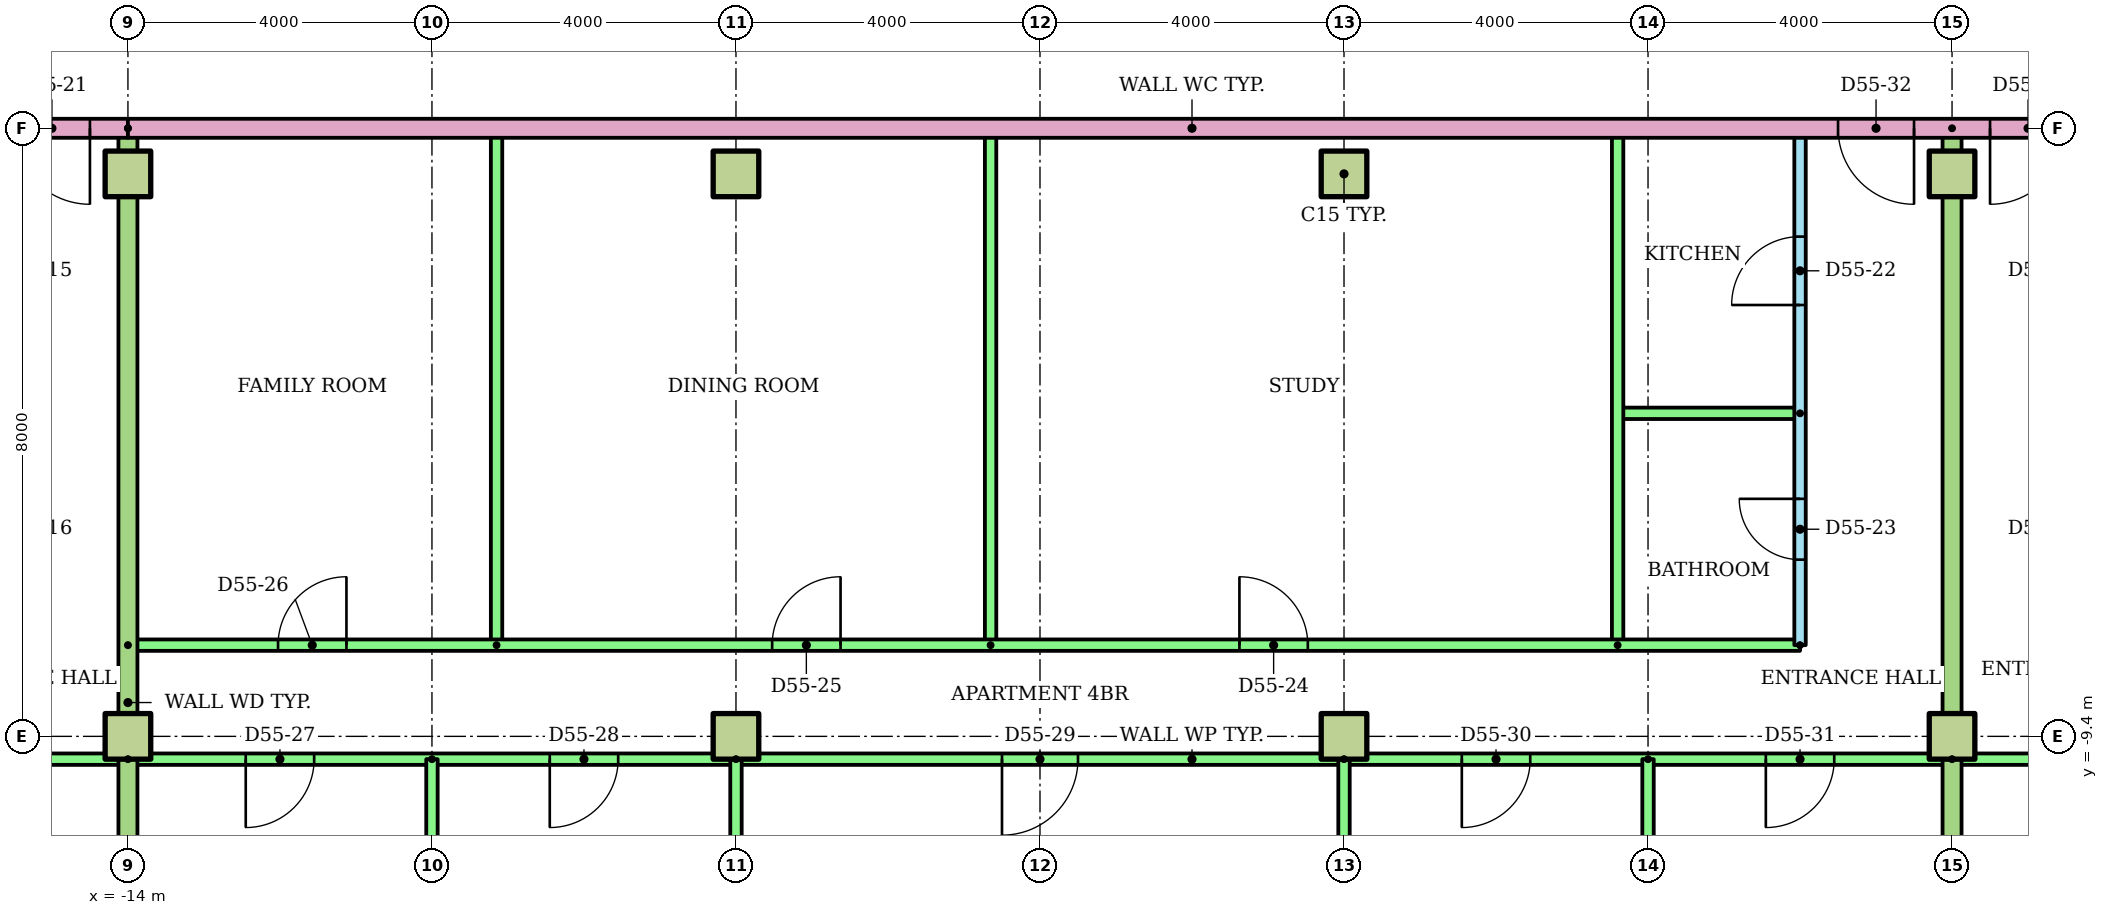
"""IFC4 building model, lengths in metres.
Left out: names, types, materials, properties, quantities, classifications, styles, units other than length and angle.
Written with IfcOpenShell. Run it as: python <this file> out.ifc"""

import sys

from ifc_helpers import new_model, si_unit, direction, frame, frame_2d, origin, origin_2d, place, context, subcontext, project, spatial, rectangle, extrude, element, fill, save


model = new_model("IFC4")
c1 = context("Model", 3, precision=1e-05, world=origin(), true_north=direction((0.0, 1.0)))
c2 = subcontext(c1, "Body", "Model", "MODEL_VIEW")
j1 = project(units=[si_unit("LENGTHUNIT", "METRE"), si_unit("PLANEANGLEUNIT", "RADIAN")], contexts=[c1])
p1 = place(None, origin())
s1 = spatial("IfcSite", under=j1, at=p1, CompositionType="ELEMENT")
p2 = place(p1, origin())
s2 = spatial("IfcBuilding", under=s1, at=p2, CompositionType="ELEMENT")
p3 = place(p2, frame((0.0, 0.0, 214.0)))
s3 = spatial("IfcBuildingStorey", under=s2, at=p3, CompositionType="ELEMENT", Elevation=214.0)
for number, where in (
    (1, (-14.0, -9.4, 0.0)),
    (2, (-6.0, -9.4, 0.0)),
    (3, (2.0, -9.4, 0.0)),
    (4, (10.0, -9.4, 0.0)),
    (5, (-14.0, -2.0, 0.0)),
    (6, (-6.0, -2.0, 0.0)),
    (7, (2.0, -2.0, 0.0)),
    (8, (10.0, -2.0, 0.0)),
):
    element("IfcColumn", number, at=place(p3, frame(where)), inside=s3, PredefinedType="COLUMN", context=c2, shape_type="SweptSolid", body=[
        extrude(rectangle(XDim=0.6, YDim=0.6, at=origin_2d()), origin(), (0.0, 0.0, 1.0), 3.2),
    ])
p4 = place(p3, frame((-14.0, -9.7, 0.0), z_axis=(0.0, 0.0, 1.0), x_axis=(-1.0, 0.0, 0.0)))
e9 = element("IfcWall", 9, at=p4, inside=s3, PredefinedType="PARTITIONING", context=c2, shape_type="SweptSolid", body=[
    extrude(rectangle(XDim=14.92, YDim=0.15, at=frame_2d((7.46, 0.0))), origin(), (0.0, 0.0, 1.0), 2.4),
])
p5 = place(p4, frame((12.0, 0.0, 0.0)))
e10 = element("IfcOpeningElement", 10, at=p5, cuts=e9, PredefinedType="OPENING", context=c2, shape_type="SweptSolid", body=[
    extrude(rectangle(XDim=0.9, YDim=2.1, at=frame_2d((0.45, 1.05))), frame((0.0, 0.085, 0.0), z_axis=(0.0, -1.0, 0.0), x_axis=(1.0, 0.0, 0.0)), (0.0, 0.0, 1.0), 0.17),
])
p6 = place(p4, frame((4.6, 0.0, 0.0)))
e11 = element("IfcOpeningElement", 11, at=p6, cuts=e9, PredefinedType="OPENING", context=c2, shape_type="SweptSolid", body=[
    extrude(rectangle(XDim=1.0, YDim=2.1, at=frame_2d((0.5, 1.05))), frame((0.0, 0.085, 0.0), z_axis=(0.0, -1.0, 0.0), x_axis=(1.0, 0.0, 0.0)), (0.0, 0.0, 1.0), 0.17),
])
p7 = place(p3, frame((8.0, -8.2, 0.0), z_axis=(0.0, 0.0, 1.0), x_axis=(0.0, 1.0, 0.0)))
e12 = element("IfcWall", 12, at=p7, inside=s3, PredefinedType="PARTITIONING", context=c2, shape_type="SweptSolid", body=[
    extrude(rectangle(XDim=6.8, YDim=0.15, at=frame_2d((3.4, 0.0))), origin(), (0.0, 0.0, 1.0), 2.4),
])
p8 = place(p7, frame((4.475, 0.0, 0.0)))
e13 = element("IfcOpeningElement", 13, at=p8, cuts=e12, PredefinedType="OPENING", context=c2, shape_type="SweptSolid", body=[
    extrude(rectangle(XDim=0.9, YDim=2.1, at=frame_2d((0.45, 1.05))), frame((0.0, 0.085, 0.0), z_axis=(0.0, -1.0, 0.0), x_axis=(1.0, 0.0, 0.0)), (0.0, 0.0, 1.0), 0.17),
])
p9 = place(p7, frame((1.125, 0.0, 0.0)))
e14 = element("IfcOpeningElement", 14, at=p9, cuts=e12, PredefinedType="OPENING", context=c2, shape_type="SweptSolid", body=[
    extrude(rectangle(XDim=0.8, YDim=2.1, at=frame_2d((0.4, 1.05))), frame((0.0, 0.085, 0.0), z_axis=(0.0, -1.0, 0.0), x_axis=(1.0, 0.0, 0.0)), (0.0, 0.0, 1.0), 0.17),
])
p10 = place(p3, frame((8.0, -5.15, 0.0), z_axis=(0.0, 0.0, 1.0), x_axis=(-1.0, 0.0, 0.0)))
e15 = element("IfcWall", 15, at=p10, inside=s3, PredefinedType="PARTITIONING", context=c2, shape_type="SweptSolid", body=[
    extrude(rectangle(XDim=2.4, YDim=0.15, at=frame_2d((1.2, 0.0))), origin(), (0.0, 0.0, 1.0), 2.4),
])
for number, where, z_axis, x_axis in (
    (16, (5.6, -8.2, 0.0), (0.0, 0.0, 1.0), (0.0, 1.0, 0.0)),
    (17, (-2.65, -8.2, 0.0), (0.0, 0.0, 1.0), (0.0, 1.0, 0.0)),
    (18, (-9.15, -8.2, 0.0), (0.0, 0.0, 1.0), (0.0, 1.0, 0.0)),
):
    element("IfcWall", number, at=place(p3, frame(where, z_axis=z_axis, x_axis=x_axis)), inside=s3, PredefinedType="PARTITIONING", context=c2, shape_type="SweptSolid", body=[
        extrude(rectangle(XDim=6.8, YDim=0.15, at=frame_2d((3.4, 0.0))), origin(), (0.0, 0.0, 1.0), 2.4),
    ])
p11 = place(p3, frame((-14.0, -8.2, 0.0)))
e19 = element("IfcWall", 19, at=p11, inside=s3, PredefinedType="PARTITIONING", context=c2, shape_type="SweptSolid", body=[
    extrude(rectangle(XDim=22.0, YDim=0.15, at=frame_2d((11.0, 0.0))), origin(), (0.0, 0.0, 1.0), 2.4),
])
p12 = place(p11, frame((14.624, 0.0, 0.0)))
e20 = element("IfcOpeningElement", 20, at=p12, cuts=e19, PredefinedType="OPENING", context=c2, shape_type="SweptSolid", body=[
    extrude(rectangle(XDim=0.9, YDim=2.1, at=frame_2d((0.45, 1.05))), frame((0.0, 0.085, 0.0), z_axis=(0.0, -1.0, 0.0), x_axis=(1.0, 0.0, 0.0)), (0.0, 0.0, 1.0), 0.17),
])
p13 = place(p11, frame((8.476, 0.0, 0.0)))
e21 = element("IfcOpeningElement", 21, at=p13, cuts=e19, PredefinedType="OPENING", context=c2, shape_type="SweptSolid", body=[
    extrude(rectangle(XDim=0.9, YDim=2.1, at=frame_2d((0.45, 1.05))), frame((0.0, 0.085, 0.0), z_axis=(0.0, -1.0, 0.0), x_axis=(1.0, 0.0, 0.0)), (0.0, 0.0, 1.0), 0.17),
])
p14 = place(p11, frame((1.975, 0.0, 0.0)))
e22 = element("IfcOpeningElement", 22, at=p14, cuts=e19, PredefinedType="OPENING", context=c2, shape_type="SweptSolid", body=[
    extrude(rectangle(XDim=0.9, YDim=2.1, at=frame_2d((0.45, 1.05))), frame((0.0, 0.085, 0.0), z_axis=(0.0, -1.0, 0.0), x_axis=(1.0, 0.0, 0.0)), (0.0, 0.0, 1.0), 0.17),
])
p15 = place(p3, frame((10.0, -9.7, 0.0), z_axis=(0.0, 0.0, 1.0), x_axis=(-1.0, 0.0, 0.0)))
e23 = element("IfcWall", 23, at=p15, inside=s3, PredefinedType="PARTITIONING", context=c2, shape_type="SweptSolid", body=[
    extrude(rectangle(XDim=24.0, YDim=0.15, at=frame_2d((12.0, 0.0))), origin(), (0.0, 0.0, 1.0), 2.4),
])
p16 = place(p15, frame((21.55, 0.0, 0.0)))
e24 = element("IfcOpeningElement", 24, at=p16, cuts=e23, PredefinedType="OPENING", context=c2, shape_type="SweptSolid", body=[
    extrude(rectangle(XDim=0.9, YDim=2.1, at=frame_2d((0.45, 1.05))), frame((0.0, 0.085, 0.0), z_axis=(0.0, -1.0, 0.0), x_axis=(1.0, 0.0, 0.0)), (0.0, 0.0, 1.0), 0.17),
])
p17 = place(p15, frame((17.55, 0.0, 0.0)))
e25 = element("IfcOpeningElement", 25, at=p17, cuts=e23, PredefinedType="OPENING", context=c2, shape_type="SweptSolid", body=[
    extrude(rectangle(XDim=0.9, YDim=2.1, at=frame_2d((0.45, 1.05))), frame((0.0, 0.085, 0.0), z_axis=(0.0, -1.0, 0.0), x_axis=(1.0, 0.0, 0.0)), (0.0, 0.0, 1.0), 0.17),
])
p18 = place(p15, frame((11.5, 0.0, 0.0)))
e26 = element("IfcOpeningElement", 26, at=p18, cuts=e23, PredefinedType="OPENING", context=c2, shape_type="SweptSolid", body=[
    extrude(rectangle(XDim=1.0, YDim=2.1, at=frame_2d((0.5, 1.05))), frame((0.0, 0.085, 0.0), z_axis=(0.0, -1.0, 0.0), x_axis=(1.0, 0.0, 0.0)), (0.0, 0.0, 1.0), 0.17),
])
p19 = place(p15, frame((5.55, 0.0, 0.0)))
e27 = element("IfcOpeningElement", 27, at=p19, cuts=e23, PredefinedType="OPENING", context=c2, shape_type="SweptSolid", body=[
    extrude(rectangle(XDim=0.9, YDim=2.1, at=frame_2d((0.45, 1.05))), frame((0.0, 0.085, 0.0), z_axis=(0.0, -1.0, 0.0), x_axis=(1.0, 0.0, 0.0)), (0.0, 0.0, 1.0), 0.17),
])
p20 = place(p15, frame((1.55, 0.0, 0.0)))
e28 = element("IfcOpeningElement", 28, at=p20, cuts=e23, PredefinedType="OPENING", context=c2, shape_type="SweptSolid", body=[
    extrude(rectangle(XDim=0.9, YDim=2.1, at=frame_2d((0.45, 1.05))), frame((0.0, 0.085, 0.0), z_axis=(0.0, -1.0, 0.0), x_axis=(1.0, 0.0, 0.0)), (0.0, 0.0, 1.0), 0.17),
])
p21 = place(p3, frame((-10.0, -9.7, 0.0), z_axis=(0.0, 0.0, 1.0), x_axis=(0.0, -1.0, 0.0)))
e29 = element("IfcWall", 29, at=p21, inside=s3, PredefinedType="PARTITIONING", context=c2, shape_type="SweptSolid", body=[
    extrude(rectangle(XDim=6.821, YDim=0.15, at=frame_2d((3.411, 0.0))), origin(), (0.0, 0.0, 1.0), 2.4),
])
for number, where, z_axis, x_axis in (
    (30, (-6.0, -9.7, 0.0), (0.0, 0.0, 1.0), (0.0, -1.0, 0.0)),
    (31, (2.0, -9.7, 0.0), (0.0, 0.0, 1.0), (0.0, -1.0, 0.0)),
):
    element("IfcWall", number, at=place(p3, frame(where, z_axis=z_axis, x_axis=x_axis)), inside=s3, PredefinedType="PARTITIONING", context=c2, shape_type="SweptSolid", body=[
        extrude(rectangle(XDim=6.81, YDim=0.15, at=frame_2d((3.405, 0.0))), origin(), (0.0, 0.0, 1.0), 2.4),
    ])
p22 = place(p3, frame((6.0, -9.7, 0.0), z_axis=(0.0, 0.0, 1.0), x_axis=(0.0, -1.0, 0.0)))
e32 = element("IfcWall", 32, at=p22, inside=s3, PredefinedType="PARTITIONING", context=c2, shape_type="SweptSolid", body=[
    extrude(rectangle(XDim=6.821, YDim=0.15, at=frame_2d((3.411, 0.0))), origin(), (0.0, 0.0, 1.0), 2.4),
])
p23 = place(p3, frame((-14.0, -1.4, 0.0), z_axis=(0.0, 0.0, 1.0), x_axis=(0.0, -1.0, 0.0)))
e33 = element("IfcWall", 33, at=p23, inside=s3, PredefinedType="PARTITIONING", context=c2, shape_type="SweptSolid", body=[
    extrude(rectangle(XDim=15.11, YDim=0.25, at=frame_2d((7.555, 0.0))), origin(), (0.0, 0.0, 1.0), 2.4),
])
p24 = place(p3, frame((18.0, -9.7, 0.0), z_axis=(0.0, 0.0, 1.0), x_axis=(-1.0, 0.0, 0.0)))
e34 = element("IfcWall", 34, at=p24, inside=s3, PredefinedType="PARTITIONING", context=c2, shape_type="SweptSolid", body=[
    extrude(rectangle(XDim=8.0, YDim=0.15, at=frame_2d((4.0, 0.0))), origin(), (0.0, 0.0, 1.0), 2.4),
])
p25 = place(p24, frame((5.5, 0.0, 0.0)))
e35 = element("IfcOpeningElement", 35, at=p25, cuts=e34, PredefinedType="OPENING", context=c2, shape_type="SweptSolid", body=[
    extrude(rectangle(XDim=1.0, YDim=2.1, at=frame_2d((0.5, 1.05))), frame((0.0, 0.085, 0.0), z_axis=(0.0, -1.0, 0.0), x_axis=(1.0, 0.0, 0.0)), (0.0, 0.0, 1.0), 0.17),
])
p26 = place(p24, frame((1.5, 0.0, 0.0)))
e36 = element("IfcOpeningElement", 36, at=p26, cuts=e34, PredefinedType="OPENING", context=c2, shape_type="SweptSolid", body=[
    extrude(rectangle(XDim=1.0, YDim=2.1, at=frame_2d((0.5, 1.05))), frame((0.0, 0.085, 0.0), z_axis=(0.0, -1.0, 0.0), x_axis=(1.0, 0.0, 0.0)), (0.0, 0.0, 1.0), 0.17),
])
p27 = place(p3, frame((10.0, -1.4, 0.0), z_axis=(0.0, 0.0, 1.0), x_axis=(0.0, -1.0, 0.0)))
e37 = element("IfcWall", 37, at=p27, inside=s3, PredefinedType="PARTITIONING", context=c2, shape_type="SweptSolid", body=[
    extrude(rectangle(XDim=15.11, YDim=0.25, at=frame_2d((7.555, 0.0))), origin(), (0.0, 0.0, 1.0), 2.4),
])
p28 = place(p3, frame((-14.0, -1.4, 0.0), z_axis=(0.0, 0.0, 1.0), x_axis=(-1.0, 0.0, 0.0)))
e38 = element("IfcWall", 38, at=p28, inside=s3, PredefinedType="PARTITIONING", context=c2, shape_type="SweptSolid", body=[
    extrude(rectangle(XDim=14.92, YDim=0.25, at=frame_2d((7.46, 0.0))), origin(), (0.0, 0.0, 1.0), 2.4),
])
p29 = place(p28, frame((0.5, 0.0, 0.0)))
e39 = element("IfcOpeningElement", 39, at=p29, cuts=e38, PredefinedType="OPENING", context=c2, shape_type="SweptSolid", body=[
    extrude(rectangle(XDim=1.0, YDim=2.1, at=frame_2d((0.5, 1.05))), frame((0.0, 0.135, 0.0), z_axis=(0.0, -1.0, 0.0), x_axis=(1.0, 0.0, 0.0)), (0.0, 0.0, 1.0), 0.27),
])
p30 = place(p3, frame((14.0, -1.4, 0.0), z_axis=(0.0, 0.0, 1.0), x_axis=(-1.0, 0.0, 0.0)))
e40 = element("IfcWall", 40, at=p30, inside=s3, PredefinedType="PARTITIONING", context=c2, shape_type="SweptSolid", body=[
    extrude(rectangle(XDim=28.0, YDim=0.25, at=frame_2d((14.0, 0.0))), origin(), (0.0, 0.0, 1.0), 2.4),
])
p31 = place(p30, frame((4.5, 0.0, 0.0)))
e41 = element("IfcOpeningElement", 41, at=p31, cuts=e40, PredefinedType="OPENING", context=c2, shape_type="SweptSolid", body=[
    extrude(rectangle(XDim=1.0, YDim=2.1, at=frame_2d((0.5, 1.05))), frame((0.0, 0.135, 0.0), z_axis=(0.0, -1.0, 0.0), x_axis=(1.0, 0.0, 0.0)), (0.0, 0.0, 1.0), 0.27),
])
p32 = place(p30, frame((2.5, 0.0, 0.0)))
e42 = element("IfcOpeningElement", 42, at=p32, cuts=e40, PredefinedType="OPENING", context=c2, shape_type="SweptSolid", body=[
    extrude(rectangle(XDim=1.0, YDim=2.1, at=frame_2d((0.5, 1.05))), frame((0.0, 0.135, 0.0), z_axis=(0.0, -1.0, 0.0), x_axis=(1.0, 0.0, 0.0)), (0.0, 0.0, 1.0), 0.27),
])
p33 = place(p29, origin())
e43 = element("IfcDoor", 43, at=p33, inside=s3, OperationType="SINGLE_SWING_LEFT", PredefinedType="DOOR", context=c2, shape_type="SweptSolid", body=[
    extrude(rectangle(XDim=1.0, YDim=2.1, at=frame_2d((0.5, 1.05))), frame((0.0, 0.025, 0.0), z_axis=(0.0, -1.0, 0.0), x_axis=(1.0, 0.0, 0.0)), (0.0, 0.0, 1.0), 0.05),
])
fill(e39, e43)
p34 = place(p8, origin())
e44 = element("IfcDoor", 44, at=p34, inside=s3, OperationType="SINGLE_SWING_LEFT", PredefinedType="DOOR", context=c2, shape_type="SweptSolid", body=[
    extrude(rectangle(XDim=0.9, YDim=2.1, at=frame_2d((0.45, 1.05))), frame((0.0, 0.025, 0.0), z_axis=(0.0, -1.0, 0.0), x_axis=(1.0, 0.0, 0.0)), (0.0, 0.0, 1.0), 0.05),
])
fill(e13, e44)
p35 = place(p9, origin())
e45 = element("IfcDoor", 45, at=p35, inside=s3, OperationType="SINGLE_SWING_RIGHT", PredefinedType="DOOR", context=c2, shape_type="SweptSolid", body=[
    extrude(rectangle(XDim=0.8, YDim=2.1, at=frame_2d((0.4, 1.05))), frame((0.0, 0.025, 0.0), z_axis=(0.0, -1.0, 0.0), x_axis=(1.0, 0.0, 0.0)), (0.0, 0.0, 1.0), 0.05),
])
fill(e14, e45)
p36 = place(p12, origin())
e46 = element("IfcDoor", 46, at=p36, inside=s3, OperationType="SINGLE_SWING_LEFT", PredefinedType="DOOR", context=c2, shape_type="SweptSolid", body=[
    extrude(rectangle(XDim=0.9, YDim=2.1, at=frame_2d((0.45, 1.05))), frame((0.0, 0.025, 0.0), z_axis=(0.0, -1.0, 0.0), x_axis=(1.0, 0.0, 0.0)), (0.0, 0.0, 1.0), 0.05),
])
fill(e20, e46)
p37 = place(p13, origin())
e47 = element("IfcDoor", 47, at=p37, inside=s3, OperationType="SINGLE_SWING_RIGHT", PredefinedType="DOOR", context=c2, shape_type="SweptSolid", body=[
    extrude(rectangle(XDim=0.9, YDim=2.1, at=frame_2d((0.45, 1.05))), frame((0.0, 0.025, 0.0), z_axis=(0.0, -1.0, 0.0), x_axis=(1.0, 0.0, 0.0)), (0.0, 0.0, 1.0), 0.05),
])
fill(e21, e47)
p38 = place(p14, origin())
e48 = element("IfcDoor", 48, at=p38, inside=s3, OperationType="SINGLE_SWING_RIGHT", PredefinedType="DOOR", context=c2, shape_type="SweptSolid", body=[
    extrude(rectangle(XDim=0.9, YDim=2.1, at=frame_2d((0.45, 1.05))), frame((0.0, 0.025, 0.0), z_axis=(0.0, -1.0, 0.0), x_axis=(1.0, 0.0, 0.0)), (0.0, 0.0, 1.0), 0.05),
])
fill(e22, e48)
p39 = place(p16, origin())
e49 = element("IfcDoor", 49, at=p39, inside=s3, OperationType="SINGLE_SWING_RIGHT", PredefinedType="DOOR", context=c2, shape_type="SweptSolid", body=[
    extrude(rectangle(XDim=0.9, YDim=2.1, at=frame_2d((0.45, 1.05))), frame((0.0, 0.025, 0.0), z_axis=(0.0, -1.0, 0.0), x_axis=(1.0, 0.0, 0.0)), (0.0, 0.0, 1.0), 0.05),
])
fill(e24, e49)
p40 = place(p17, origin())
e50 = element("IfcDoor", 50, at=p40, inside=s3, OperationType="SINGLE_SWING_RIGHT", PredefinedType="DOOR", context=c2, shape_type="SweptSolid", body=[
    extrude(rectangle(XDim=0.9, YDim=2.1, at=frame_2d((0.45, 1.05))), frame((0.0, 0.025, 0.0), z_axis=(0.0, -1.0, 0.0), x_axis=(1.0, 0.0, 0.0)), (0.0, 0.0, 1.0), 0.05),
])
fill(e25, e50)
p41 = place(p18, origin())
e51 = element("IfcDoor", 51, at=p41, inside=s3, OperationType="SINGLE_SWING_RIGHT", PredefinedType="DOOR", context=c2, shape_type="SweptSolid", body=[
    extrude(rectangle(XDim=1.0, YDim=2.1, at=frame_2d((0.5, 1.05))), frame((0.0, 0.025, 0.0), z_axis=(0.0, -1.0, 0.0), x_axis=(1.0, 0.0, 0.0)), (0.0, 0.0, 1.0), 0.05),
])
fill(e26, e51)
p42 = place(p19, origin())
e52 = element("IfcDoor", 52, at=p42, inside=s3, OperationType="SINGLE_SWING_RIGHT", PredefinedType="DOOR", context=c2, shape_type="SweptSolid", body=[
    extrude(rectangle(XDim=0.9, YDim=2.1, at=frame_2d((0.45, 1.05))), frame((0.0, 0.025, 0.0), z_axis=(0.0, -1.0, 0.0), x_axis=(1.0, 0.0, 0.0)), (0.0, 0.0, 1.0), 0.05),
])
fill(e27, e52)
p43 = place(p20, origin())
e53 = element("IfcDoor", 53, at=p43, inside=s3, OperationType="SINGLE_SWING_RIGHT", PredefinedType="DOOR", context=c2, shape_type="SweptSolid", body=[
    extrude(rectangle(XDim=0.9, YDim=2.1, at=frame_2d((0.45, 1.05))), frame((0.0, 0.025, 0.0), z_axis=(0.0, -1.0, 0.0), x_axis=(1.0, 0.0, 0.0)), (0.0, 0.0, 1.0), 0.05),
])
fill(e28, e53)
p44 = place(p31, origin())
e54 = element("IfcDoor", 54, at=p44, inside=s3, OperationType="SINGLE_SWING_LEFT", PredefinedType="DOOR", context=c2, shape_type="SweptSolid", body=[
    extrude(rectangle(XDim=1.0, YDim=2.1, at=frame_2d((0.5, 1.05))), frame((0.0, 0.025, 0.0), z_axis=(0.0, -1.0, 0.0), x_axis=(1.0, 0.0, 0.0)), (0.0, 0.0, 1.0), 0.05),
])
fill(e41, e54)
p45 = place(p32, origin())
e55 = element("IfcDoor", 55, at=p45, inside=s3, OperationType="SINGLE_SWING_RIGHT", PredefinedType="DOOR", context=c2, shape_type="SweptSolid", body=[
    extrude(rectangle(XDim=1.0, YDim=2.1, at=frame_2d((0.5, 1.05))), frame((0.0, 0.025, 0.0), z_axis=(0.0, -1.0, 0.0), x_axis=(1.0, 0.0, 0.0)), (0.0, 0.0, 1.0), 0.05),
])
fill(e42, e55)
save(model, sys.argv[1])
